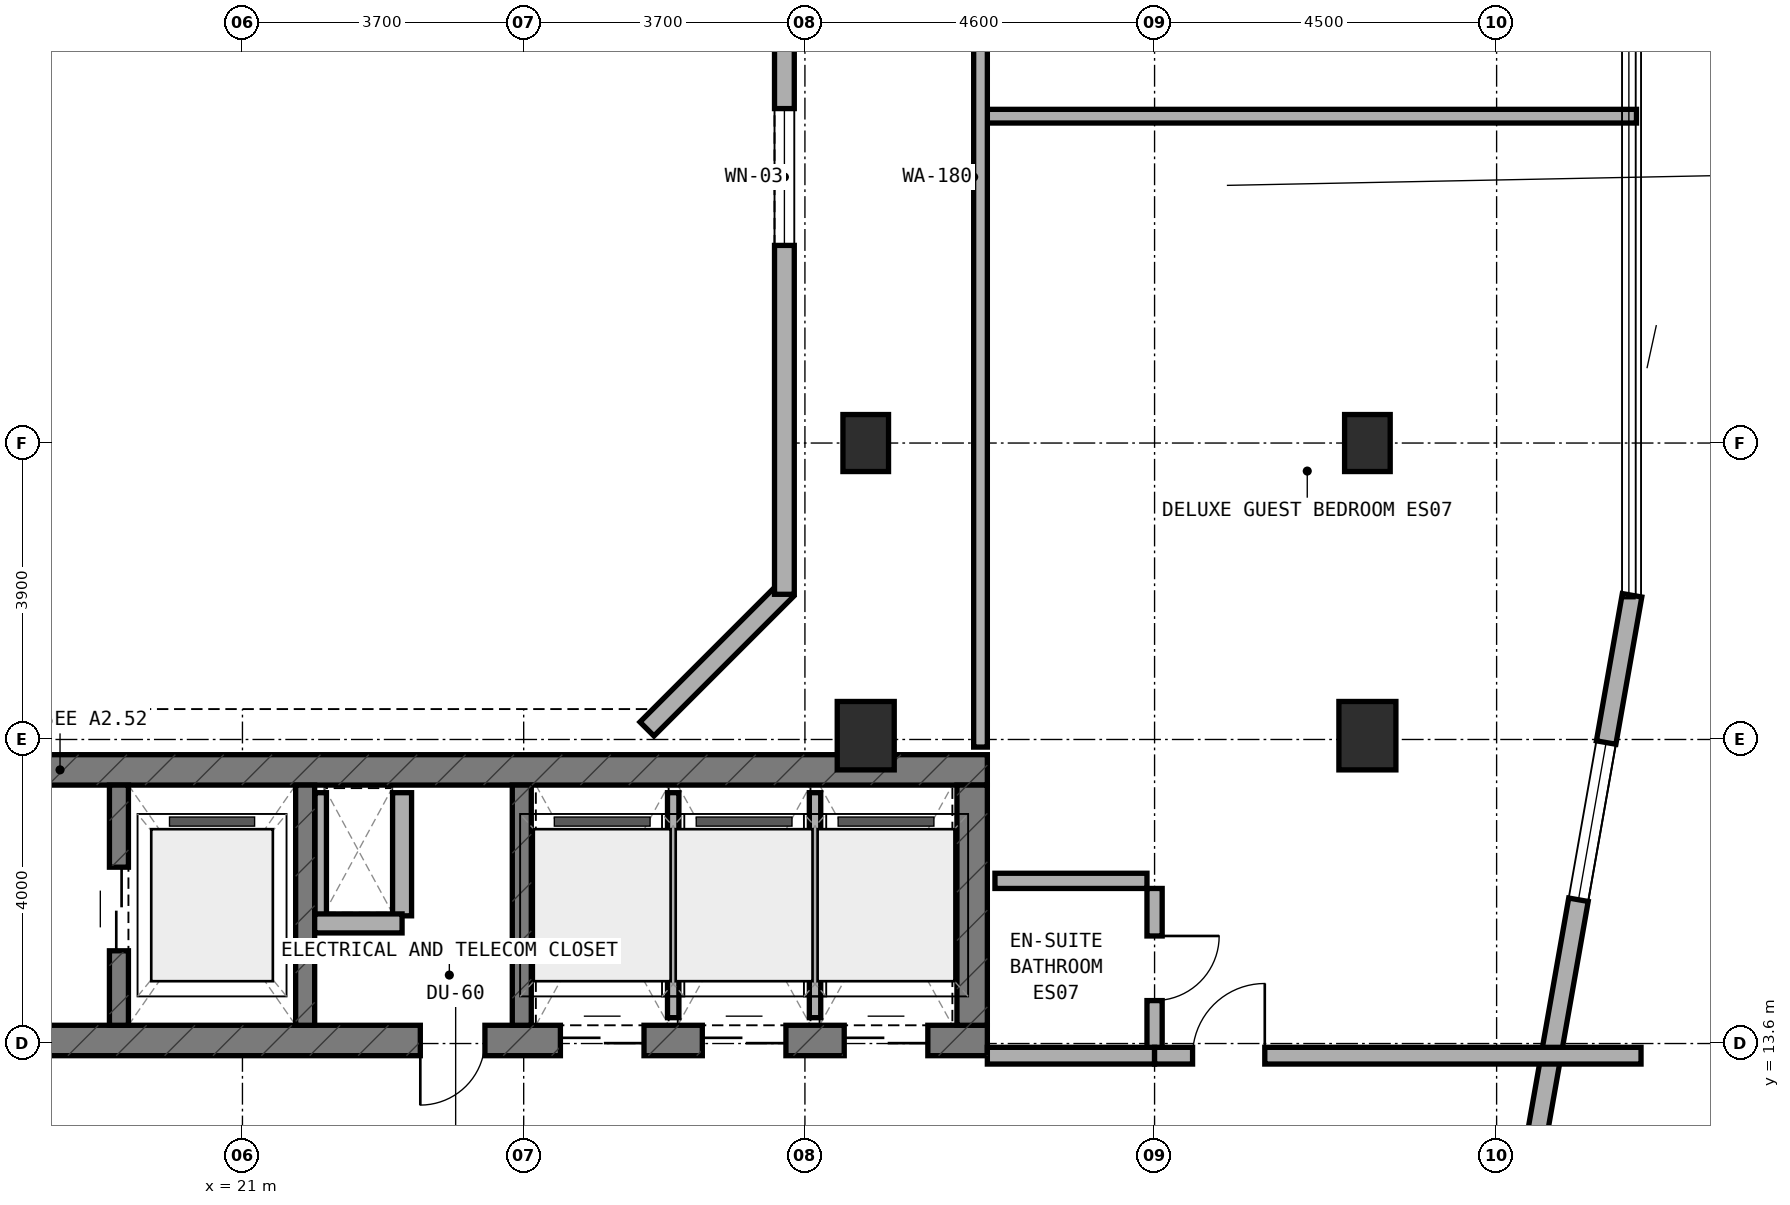
"""IFC4 building model, lengths in metres.
Left out: names, types, materials, properties, quantities, classifications, styles, units other than length and angle.
Written with IfcOpenShell. Run it as: python <this file> out.ifc"""

import sys

from ifc_helpers import new_model, si_unit, direction, frame, frame_2d, origin, origin_2d, place, context, subcontext, project, spatial, rectangle, extrude, element, fill, save


model = new_model("IFC4")
c1 = context("Model", 3, precision=1e-05, world=origin(), true_north=direction((0.0, 1.0)))
c2 = subcontext(c1, "Body", "Model", "MODEL_VIEW")
j1 = project(units=[si_unit("LENGTHUNIT", "METRE"), si_unit("PLANEANGLEUNIT", "RADIAN")], contexts=[c1])
p1 = place(None, origin())
s1 = spatial("IfcSite", under=j1, at=p1, CompositionType="ELEMENT")
p2 = place(p1, origin())
s2 = spatial("IfcBuilding", under=s1, at=p2, CompositionType="ELEMENT")
p3 = place(p2, frame((0.0, 0.0, 243.2)))
s3 = spatial("IfcBuildingStorey", under=s2, at=p3, CompositionType="ELEMENT", Elevation=243.2)
p4 = place(p3, frame((6.4, 13.64, 0.0), z_axis=(0.0, 0.0, 1.0), x_axis=(1.0, 0.0, 0.0)))
e1 = element("IfcWall", 1, at=p4, inside=s3, PredefinedType="SHEAR", context=c2, shape_type="SweptSolid", body=[
    extrude(rectangle(XDim=24.4, YDim=0.4, at=frame_2d((12.2, 0.0))), origin(), (0.0, 0.0, 1.0), 3.6),
])
p5 = place(p4, frame((9.15, 0.0, 0.0)))
e2 = element("IfcOpeningElement", 2, at=p5, cuts=e1, PredefinedType="OPENING", context=c2, shape_type="SweptSolid", body=[
    extrude(rectangle(XDim=1.2, YDim=2.15, at=frame_2d((0.6, 1.075))), frame((0.0, 0.21, 0.0), z_axis=(0.0, -1.0, 0.0), x_axis=(1.0, 0.0, 0.0)), (0.0, 0.0, 1.0), 0.42),
])
p6 = place(p4, frame((16.94, 0.0, 0.0)))
e3 = element("IfcOpeningElement", 3, at=p6, cuts=e1, PredefinedType="OPENING", context=c2, shape_type="SweptSolid", body=[
    extrude(rectangle(XDim=0.85, YDim=2.1, at=frame_2d((0.425, 1.05))), frame((0.0, 0.21, 0.0), z_axis=(0.0, -1.0, 0.0), x_axis=(1.0, 0.0, 0.0)), (0.0, 0.0, 1.0), 0.42),
])
p7 = place(p4, frame((18.783, 0.0, 0.0)))
e4 = element("IfcOpeningElement", 4, at=p7, cuts=e1, PredefinedType="OPENING", context=c2, shape_type="SweptSolid", body=[
    extrude(rectangle(XDim=1.1, YDim=2.15, at=frame_2d((0.55, 1.075))), frame((0.0, 0.21, 0.0), z_axis=(0.0, -1.0, 0.0), x_axis=(1.0, 0.0, 0.0)), (0.0, 0.0, 1.0), 0.42),
])
p8 = place(p4, frame((20.65, 0.0, 0.0)))
e5 = element("IfcOpeningElement", 5, at=p8, cuts=e1, PredefinedType="OPENING", context=c2, shape_type="SweptSolid", body=[
    extrude(rectangle(XDim=1.1, YDim=2.15, at=frame_2d((0.55, 1.075))), frame((0.0, 0.21, 0.0), z_axis=(0.0, -1.0, 0.0), x_axis=(1.0, 0.0, 0.0)), (0.0, 0.0, 1.0), 0.42),
])
p9 = place(p4, frame((22.517, 0.0, 0.0)))
e6 = element("IfcOpeningElement", 6, at=p9, cuts=e1, PredefinedType="OPENING", context=c2, shape_type="SweptSolid", body=[
    extrude(rectangle(XDim=1.1, YDim=2.15, at=frame_2d((0.55, 1.075))), frame((0.0, 0.21, 0.0), z_axis=(0.0, -1.0, 0.0), x_axis=(1.0, 0.0, 0.0)), (0.0, 0.0, 1.0), 0.42),
])
p10 = place(p3, frame((6.4, 17.2, 0.0), z_axis=(0.0, 0.0, 1.0), x_axis=(1.0, 0.0, 0.0)))
e7 = element("IfcWall", 7, at=p10, inside=s3, PredefinedType="SHEAR", context=c2, shape_type="SweptSolid", body=[
    extrude(rectangle(XDim=24.4, YDim=0.4, at=frame_2d((12.2, 0.0))), origin(), (0.0, 0.0, 1.0), 3.6),
])
p11 = place(p3, frame((30.6, 13.84, 0.0), z_axis=(0.0, 0.0, 1.0), x_axis=(0.0, 1.0, 0.0)))
e8 = element("IfcWall", 8, at=p11, inside=s3, PredefinedType="SHEAR", context=c2, shape_type="SweptSolid", body=[
    extrude(rectangle(XDim=3.16, YDim=0.4, at=frame_2d((1.58, 0.0))), origin(), (0.0, 0.0, 1.0), 3.6),
])
p12 = place(p3, frame((19.375, 13.84, 0.0), z_axis=(0.0, 0.0, 1.0), x_axis=(0.0, 1.0, 0.0)))
e9 = element("IfcWall", 9, at=p12, inside=s3, PredefinedType="STANDARD", context=c2, shape_type="SweptSolid", body=[
    extrude(rectangle(XDim=3.16, YDim=0.25, at=frame_2d((1.58, 0.0))), origin(), (0.0, 0.0, 1.0), 3.32),
])
p13 = place(p12, frame((0.98, 0.0, 0.0)))
e10 = element("IfcOpeningElement", 10, at=p13, cuts=e9, PredefinedType="OPENING", context=c2, shape_type="SweptSolid", body=[
    extrude(rectangle(XDim=1.1, YDim=2.15, at=frame_2d((0.55, 1.075))), frame((0.0, 0.135, 0.0), z_axis=(0.0, -1.0, 0.0), x_axis=(1.0, 0.0, 0.0)), (0.0, 0.0, 1.0), 0.27),
])
for number, where, z_axis, x_axis in (
    (11, (21.825, 13.84, 0.0), (0.0, 0.0, 1.0), (0.0, 1.0, 0.0)),
    (12, (24.675, 13.84, 0.0), (0.0, 0.0, 1.0), (0.0, 1.0, 0.0)),
):
    element("IfcWall", number, at=place(p3, frame(where, z_axis=z_axis, x_axis=x_axis)), inside=s3, PredefinedType="STANDARD", context=c2, shape_type="SweptSolid", body=[
        extrude(rectangle(XDim=3.16, YDim=0.25, at=frame_2d((1.58, 0.0))), origin(), (0.0, 0.0, 1.0), 3.32),
    ])
p14 = place(p3, frame((35.8, 21.5, 0.0), z_axis=(0.0, 0.0, 1.0), x_axis=(1.0, 0.0, 0.0)))
e13 = element("IfcColumn", 13, at=p14, inside=s3, PredefinedType="COLUMN", context=c2, shape_type="SweptSolid", body=[
    extrude(rectangle(XDim=0.6, YDim=0.75, at=origin_2d()), origin(), (0.0, 0.0, 1.0), 3.6),
])
for number, where, z_axis, x_axis in (
    (14, (35.8, 17.65, 0.0), (0.0, 0.0, 1.0), (1.0, 0.0, 0.0)),
    (15, (29.2, 17.65, 0.0), (0.0, 0.0, 1.0), (1.0, 0.0, 0.0)),
):
    element("IfcColumn", number, at=place(p3, frame(where, z_axis=z_axis, x_axis=x_axis)), inside=s3, PredefinedType="COLUMN", context=c2, shape_type="SweptSolid", body=[
        extrude(rectangle(XDim=0.75, YDim=0.9, at=origin_2d()), origin(), (0.0, 0.0, 1.0), 3.6),
    ])
p15 = place(p3, frame((29.2, 21.5, 0.0), z_axis=(0.0, 0.0, 1.0), x_axis=(1.0, 0.0, 0.0)))
e16 = element("IfcColumn", 16, at=p15, inside=s3, PredefinedType="COLUMN", context=c2, shape_type="SweptSolid", body=[
    extrude(rectangle(XDim=0.6, YDim=0.75, at=origin_2d()), origin(), (0.0, 0.0, 1.0), 3.6),
])
p16 = place(p3, frame((37.771, 10.915, 0.0), z_axis=(0.0, 0.0, 1.0), x_axis=(0.173396937698, 0.984852020355, 0.0)))
e17 = element("IfcWall", 17, at=p16, inside=s3, PredefinedType="STANDARD", context=c2, shape_type="SweptSolid", body=[
    extrude(rectangle(XDim=8.714, YDim=0.26, at=frame_2d((4.357, 0.0))), origin(), (0.0, 0.0, 1.0), 3.32),
])
p17 = place(p16, frame((4.647, 0.0, 0.85)))
e18 = element("IfcOpeningElement", 18, at=p17, cuts=e17, PredefinedType="OPENING", context=c2, shape_type="SweptSolid", body=[
    extrude(rectangle(XDim=2.1, YDim=1.5, at=frame_2d((1.05, 0.75))), frame((0.0, 0.14, 0.0), z_axis=(0.0, -1.0, 0.0), x_axis=(1.0, 0.0, 0.0)), (0.0, 0.0, 1.0), 0.28),
])
p18 = place(p3, frame((26.322, 17.738, 0.0), z_axis=(0.0, 0.0, 1.0), x_axis=(0.707106781187, 0.707106781187, 0.0)))
e19 = element("IfcWall", 19, at=p18, inside=s3, PredefinedType="STANDARD", context=c2, shape_type="SweptSolid", body=[
    extrude(rectangle(XDim=2.594, YDim=0.26, at=frame_2d((1.297, 0.0))), origin(), (0.0, 0.0, 1.0), 3.32),
])
p19 = place(p3, frame((28.13, 19.51, 0.0), z_axis=(0.0, 0.0, 1.0), x_axis=(0.0, 1.0, 0.0)))
e20 = element("IfcWall", 20, at=p19, inside=s3, PredefinedType="STANDARD", context=c2, shape_type="SweptSolid", body=[
    extrude(rectangle(XDim=10.98, YDim=0.26, at=frame_2d((5.49, 0.0))), origin(), (0.0, 0.0, 1.0), 3.32),
])
p20 = place(p19, frame((4.59, 0.0, 0.85)))
e21 = element("IfcOpeningElement", 21, at=p20, cuts=e20, PredefinedType="OPENING", context=c2, shape_type="SweptSolid", body=[
    extrude(rectangle(XDim=1.8, YDim=1.5, at=frame_2d((0.9, 0.75))), frame((0.0, 0.14, 0.0), z_axis=(0.0, -1.0, 0.0), x_axis=(1.0, 0.0, 0.0)), (0.0, 0.0, 1.0), 0.28),
])
p21 = place(p3, frame((22.03, 15.28, 0.0), z_axis=(0.0, 0.0, 1.0), x_axis=(0.0, 1.0, 0.0)))
e22 = element("IfcWall", 22, at=p21, inside=s3, PredefinedType="PARTITIONING", context=c2, shape_type="SweptSolid", body=[
    extrude(rectangle(XDim=1.62, YDim=0.15, at=frame_2d((0.81, 0.0))), origin(), (0.0, 0.0, 1.0), 3.32),
])
p22 = place(p3, frame((23.1, 15.28, 0.0), z_axis=(0.0, 0.0, 1.0), x_axis=(0.0, 1.0, 0.0)))
e23 = element("IfcWall", 23, at=p22, inside=s3, PredefinedType="SOLIDWALL", context=c2, shape_type="SweptSolid", body=[
    extrude(rectangle(XDim=1.62, YDim=0.25, at=frame_2d((0.81, 0.0))), origin(), (0.0, 0.0, 1.0), 3.32),
])
p23 = place(p3, frame((21.95, 15.18, 0.0), z_axis=(0.0, 0.0, 1.0), x_axis=(1.0, 0.0, 0.0)))
e24 = element("IfcWall", 24, at=p23, inside=s3, PredefinedType="SOLIDWALL", context=c2, shape_type="SweptSolid", body=[
    extrude(rectangle(XDim=1.15, YDim=0.25, at=frame_2d((0.575, 0.0))), origin(), (0.0, 0.0, 1.0), 3.32),
])
p24 = place(p3, frame((26.667, 13.94, 0.0), z_axis=(0.0, 0.0, 1.0), x_axis=(0.0, 1.0, 0.0)))
e25 = element("IfcWall", 25, at=p24, inside=s3, PredefinedType="PARTITIONING", context=c2, shape_type="SweptSolid", body=[
    extrude(rectangle(XDim=2.96, YDim=0.15, at=frame_2d((1.48, 0.0))), origin(), (0.0, 0.0, 1.0), 3.32),
])
p25 = place(p3, frame((28.533, 13.94, 0.0), z_axis=(0.0, 0.0, 1.0), x_axis=(0.0, 1.0, 0.0)))
e26 = element("IfcWall", 26, at=p25, inside=s3, PredefinedType="PARTITIONING", context=c2, shape_type="SweptSolid", body=[
    extrude(rectangle(XDim=2.96, YDim=0.15, at=frame_2d((1.48, 0.0))), origin(), (0.0, 0.0, 1.0), 2.745),
])
p26 = place(p3, frame((30.8, 25.8, 0.0), z_axis=(0.0, 0.0, 1.0), x_axis=(1.0, 0.0, 0.0)))
e27 = element("IfcWall", 27, at=p26, inside=s3, PredefinedType="SOLIDWALL", context=c2, shape_type="SweptSolid", body=[
    extrude(rectangle(XDim=8.54, YDim=0.18, at=frame_2d((4.27, 0.0))), origin(), (0.0, 0.0, 1.0), 3.015),
])
p27 = place(p3, frame((30.71, 17.5, 0.0), z_axis=(0.0, 0.0, 1.0), x_axis=(0.0, 1.0, 0.0)))
e28 = element("IfcWall", 28, at=p27, inside=s3, PredefinedType="SOLIDWALL", context=c2, shape_type="SweptSolid", body=[
    extrude(rectangle(XDim=15.0, YDim=0.18, at=frame_2d((7.5, 0.0))), origin(), (0.0, 0.0, 1.0), 2.745),
])
p28 = place(p3, frame((33.0, 13.54, 0.0), z_axis=(0.0, 0.0, 1.0), x_axis=(0.0, 1.0, 0.0)))
e29 = element("IfcWall", 29, at=p28, inside=s3, PredefinedType="PLUMBINGWALL", context=c2, shape_type="SweptSolid", body=[
    extrude(rectangle(XDim=2.1, YDim=0.2, at=frame_2d((1.05, 0.0))), origin(), (0.0, 0.0, 1.0), 3.32),
])
p29 = place(p28, frame((0.625, 0.0, 0.0)))
e30 = element("IfcOpeningElement", 30, at=p29, cuts=e29, PredefinedType="OPENING", context=c2, shape_type="SweptSolid", body=[
    extrude(rectangle(XDim=0.85, YDim=2.1, at=frame_2d((0.425, 1.05))), frame((0.0, 0.11, 0.0), z_axis=(0.0, -1.0, 0.0), x_axis=(1.0, 0.0, 0.0)), (0.0, 0.0, 1.0), 0.22),
])
p30 = place(p3, frame((30.9, 15.74, 0.0), z_axis=(0.0, 0.0, 1.0), x_axis=(1.0, 0.0, 0.0)))
e31 = element("IfcWall", 31, at=p30, inside=s3, PredefinedType="PLUMBINGWALL", context=c2, shape_type="SweptSolid", body=[
    extrude(rectangle(XDim=2.0, YDim=0.2, at=frame_2d((1.0, 0.0))), origin(), (0.0, 0.0, 1.0), 3.32),
])
p31 = place(p3, frame((30.8, 13.44, 0.0), z_axis=(0.0, 0.0, 1.0), x_axis=(1.0, 0.0, 0.0)))
e32 = element("IfcWall", 32, at=p31, inside=s3, PredefinedType="SOLIDWALL", context=c2, shape_type="SweptSolid", body=[
    extrude(rectangle(XDim=2.2, YDim=0.22, at=frame_2d((1.1, 0.0))), origin(), (0.0, 0.0, 1.0), 3.32),
])
p32 = place(p3, frame((33.0, 13.44, 0.0), z_axis=(0.0, 0.0, 1.0), x_axis=(1.0, 0.0, 0.0)))
e33 = element("IfcWall", 33, at=p32, inside=s3, PredefinedType="SOLIDWALL", context=c2, shape_type="SweptSolid", body=[
    extrude(rectangle(XDim=6.4, YDim=0.22, at=frame_2d((3.2, 0.0))), origin(), (0.0, 0.0, 1.0), 2.745),
])
p33 = place(p32, frame((0.5, 0.0, 0.0)))
e34 = element("IfcOpeningElement", 34, at=p33, cuts=e33, PredefinedType="OPENING", context=c2, shape_type="SweptSolid", body=[
    extrude(rectangle(XDim=0.95, YDim=2.1, at=frame_2d((0.475, 1.05))), frame((0.0, 0.12, 0.0), z_axis=(0.0, -1.0, 0.0), x_axis=(1.0, 0.0, 0.0)), (0.0, 0.0, 1.0), 0.24),
])
p34 = place(p17, origin())
e35 = element("IfcWindow", 35, at=p34, inside=s3, PartitioningType="SINGLE_PANEL", PredefinedType="WINDOW", context=c2, shape_type="SweptSolid", body=[
    extrude(rectangle(XDim=2.1, YDim=1.5, at=frame_2d((1.05, 0.75))), frame((0.0, 0.03, 0.0), z_axis=(0.0, -1.0, 0.0), x_axis=(1.0, 0.0, 0.0)), (0.0, 0.0, 1.0), 0.06),
])
fill(e18, e35)
p35 = place(p20, origin())
e36 = element("IfcWindow", 36, at=p35, inside=s3, PartitioningType="SINGLE_PANEL", PredefinedType="WINDOW", context=c2, shape_type="SweptSolid", body=[
    extrude(rectangle(XDim=1.8, YDim=1.5, at=frame_2d((0.9, 0.75))), frame((0.0, 0.03, 0.0), z_axis=(0.0, -1.0, 0.0), x_axis=(1.0, 0.0, 0.0)), (0.0, 0.0, 1.0), 0.06),
])
fill(e21, e36)
p36 = place(p13, origin())
e37 = element("IfcDoor", 37, at=p36, inside=s3, OperationType="DOUBLE_DOOR_SLIDING", PredefinedType="DOOR", context=c2, shape_type="SweptSolid", body=[
    extrude(rectangle(XDim=1.1, YDim=2.15, at=frame_2d((0.55, 1.075))), frame((0.0, 0.025, 0.0), z_axis=(0.0, -1.0, 0.0), x_axis=(1.0, 0.0, 0.0)), (0.0, 0.0, 1.0), 0.05),
])
fill(e10, e37)
p37 = place(p6, frame((0.85, 0.0, 0.0), z_axis=(0.0, 0.0, 1.0), x_axis=(-1.0, 0.0, 0.0)))
e38 = element("IfcDoor", 38, at=p37, inside=s3, OperationType="SINGLE_SWING_RIGHT", PredefinedType="DOOR", context=c2, shape_type="SweptSolid", body=[
    extrude(rectangle(XDim=0.85, YDim=2.1, at=frame_2d((0.425, 1.05))), frame((0.0, 0.025, 0.0), z_axis=(0.0, -1.0, 0.0), x_axis=(1.0, 0.0, 0.0)), (0.0, 0.0, 1.0), 0.05),
])
fill(e3, e38)
p38 = place(p7, frame((1.1, 0.0, 0.0), z_axis=(0.0, 0.0, 1.0), x_axis=(-1.0, 0.0, 0.0)))
e39 = element("IfcDoor", 39, at=p38, inside=s3, OperationType="DOUBLE_DOOR_SLIDING", PredefinedType="DOOR", context=c2, shape_type="SweptSolid", body=[
    extrude(rectangle(XDim=1.1, YDim=2.15, at=frame_2d((0.55, 1.075))), frame((0.0, 0.025, 0.0), z_axis=(0.0, -1.0, 0.0), x_axis=(1.0, 0.0, 0.0)), (0.0, 0.0, 1.0), 0.05),
])
fill(e4, e39)
p39 = place(p8, frame((1.1, 0.0, 0.0), z_axis=(0.0, 0.0, 1.0), x_axis=(-1.0, 0.0, 0.0)))
e40 = element("IfcDoor", 40, at=p39, inside=s3, OperationType="DOUBLE_DOOR_SLIDING", PredefinedType="DOOR", context=c2, shape_type="SweptSolid", body=[
    extrude(rectangle(XDim=1.1, YDim=2.15, at=frame_2d((0.55, 1.075))), frame((0.0, 0.025, 0.0), z_axis=(0.0, -1.0, 0.0), x_axis=(1.0, 0.0, 0.0)), (0.0, 0.0, 1.0), 0.05),
])
fill(e5, e40)
p40 = place(p9, frame((1.1, 0.0, 0.0), z_axis=(0.0, 0.0, 1.0), x_axis=(-1.0, 0.0, 0.0)))
e41 = element("IfcDoor", 41, at=p40, inside=s3, OperationType="DOUBLE_DOOR_SLIDING", PredefinedType="DOOR", context=c2, shape_type="SweptSolid", body=[
    extrude(rectangle(XDim=1.1, YDim=2.15, at=frame_2d((0.55, 1.075))), frame((0.0, 0.025, 0.0), z_axis=(0.0, -1.0, 0.0), x_axis=(1.0, 0.0, 0.0)), (0.0, 0.0, 1.0), 0.05),
])
fill(e6, e41)
p41 = place(p29, frame((0.85, 0.0, 0.0), z_axis=(0.0, 0.0, 1.0), x_axis=(-1.0, 0.0, 0.0)))
e42 = element("IfcDoor", 42, at=p41, inside=s3, OperationType="SINGLE_SWING_LEFT", PredefinedType="DOOR", context=c2, shape_type="SweptSolid", body=[
    extrude(rectangle(XDim=0.85, YDim=2.1, at=frame_2d((0.425, 1.05))), frame((0.0, 0.025, 0.0), z_axis=(0.0, -1.0, 0.0), x_axis=(1.0, 0.0, 0.0)), (0.0, 0.0, 1.0), 0.05),
])
fill(e30, e42)
p42 = place(p33, origin())
e43 = element("IfcDoor", 43, at=p42, inside=s3, OperationType="SINGLE_SWING_RIGHT", PredefinedType="DOOR", context=c2, shape_type="SweptSolid", body=[
    extrude(rectangle(XDim=0.95, YDim=2.1, at=frame_2d((0.475, 1.05))), frame((0.0, 0.025, 0.0), z_axis=(0.0, -1.0, 0.0), x_axis=(1.0, 0.0, 0.0)), (0.0, 0.0, 1.0), 0.05),
])
fill(e34, e43)
save(model, sys.argv[1])
